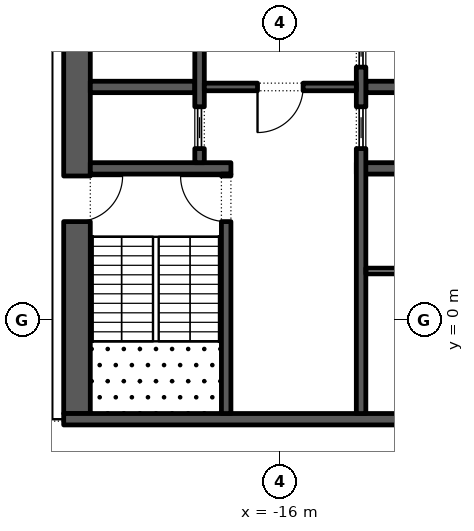
"""IFC4 building model, lengths in metres.
Left out: names, types, materials, properties, quantities, classifications, styles, units other than length and angle.
Written with IfcOpenShell. Run it as: python <this file> out.ifc"""

import sys

from ifc_helpers import new_model, si_unit, direction, frame, frame_2d, origin, place, context, subcontext, project, spatial, rectangle, extrude, element, fill, save


model = new_model("IFC4")
c1 = context("Model", 3, precision=1e-05, world=origin(), true_north=direction((0.0, 1.0)))
c2 = subcontext(c1, "Body", "Model", "MODEL_VIEW")
j1 = project(units=[si_unit("LENGTHUNIT", "METRE"), si_unit("PLANEANGLEUNIT", "RADIAN")], contexts=[c1])
p1 = place(None, origin())
s1 = spatial("IfcSite", under=j1, at=p1, CompositionType="ELEMENT")
p2 = place(p1, origin())
s2 = spatial("IfcBuilding", under=s1, at=p2, CompositionType="ELEMENT")
p3 = place(p2, frame((0.0, 0.0, 201.0)))
s3 = spatial("IfcBuildingStorey", under=s2, at=p3, CompositionType="ELEMENT", Elevation=201.0)
p4 = place(p3, frame((-33.157, 30.092, 0.0), z_axis=(0.0, 0.0, 1.0), x_axis=(0.224950279389, -0.974370243697, 0.0)))
e1 = element("IfcWall", 1, at=p4, inside=s3, PredefinedType="STANDARD", context=c2, shape_type="SweptSolid", body=[
    extrude(rectangle(XDim=49.5, YDim=0.3, at=frame_2d((24.75, 0.0))), origin(), (0.0, 0.0, 1.0), 4.0),
])
p5 = place(p4, frame((2.207, 0.0, 0.0)))
e2 = element("IfcOpeningElement", 2, at=p5, cuts=e1, PredefinedType="OPENING", context=c2, shape_type="SweptSolid", body=[
    extrude(rectangle(XDim=2.4, YDim=3.5, at=frame_2d((1.2, 1.75))), frame((0.0, 0.16, 0.0), z_axis=(0.0, -1.0, 0.0), x_axis=(1.0, 0.0, 0.0)), (0.0, 0.0, 1.0), 0.32),
])
p6 = place(p4, frame((8.121, 0.0, 0.45)))
e3 = element("IfcOpeningElement", 3, at=p6, cuts=e1, PredefinedType="OPENING", context=c2, shape_type="SweptSolid", body=[
    extrude(rectangle(XDim=4.5, YDim=2.825, at=frame_2d((2.25, 1.413))), frame((0.0, 0.16, 0.0), z_axis=(0.0, -1.0, 0.0), x_axis=(1.0, 0.0, 0.0)), (0.0, 0.0, 1.0), 0.32),
])
p7 = place(p4, frame((15.236, 0.0, 0.45)))
e4 = element("IfcOpeningElement", 4, at=p7, cuts=e1, PredefinedType="OPENING", context=c2, shape_type="SweptSolid", body=[
    extrude(rectangle(XDim=4.5, YDim=2.95, at=frame_2d((2.25, 1.475))), frame((0.0, 0.16, 0.0), z_axis=(0.0, -1.0, 0.0), x_axis=(1.0, 0.0, 0.0)), (0.0, 0.0, 1.0), 0.32),
])
p8 = place(p4, frame((22.35, 0.0, 0.45)))
e5 = element("IfcOpeningElement", 5, at=p8, cuts=e1, PredefinedType="OPENING", context=c2, shape_type="SweptSolid", body=[
    extrude(rectangle(XDim=4.5, YDim=3.0, at=frame_2d((2.25, 1.5))), frame((0.0, 0.16, 0.0), z_axis=(0.0, -1.0, 0.0), x_axis=(1.0, 0.0, 0.0)), (0.0, 0.0, 1.0), 0.32),
])
p9 = place(p4, frame((30.514, 0.0, 0.0)))
e6 = element("IfcOpeningElement", 6, at=p9, cuts=e1, PredefinedType="OPENING", context=c2, shape_type="SweptSolid", body=[
    extrude(rectangle(XDim=2.4, YDim=3.5, at=frame_2d((1.2, 1.75))), frame((0.0, 0.16, 0.0), z_axis=(0.0, -1.0, 0.0), x_axis=(1.0, 0.0, 0.0)), (0.0, 0.0, 1.0), 0.32),
])
p10 = place(p4, frame((36.579, 0.0, 0.45)))
e7 = element("IfcOpeningElement", 7, at=p10, cuts=e1, PredefinedType="OPENING", context=c2, shape_type="SweptSolid", body=[
    extrude(rectangle(XDim=4.5, YDim=3.05, at=frame_2d((2.25, 1.525))), frame((0.0, 0.16, 0.0), z_axis=(0.0, -1.0, 0.0), x_axis=(1.0, 0.0, 0.0)), (0.0, 0.0, 1.0), 0.32),
])
p11 = place(p4, frame((43.693, 0.0, 0.45)))
e8 = element("IfcOpeningElement", 8, at=p11, cuts=e1, PredefinedType="OPENING", context=c2, shape_type="SweptSolid", body=[
    extrude(rectangle(XDim=4.5, YDim=3.05, at=frame_2d((2.25, 1.525))), frame((0.0, 0.16, 0.0), z_axis=(0.0, -1.0, 0.0), x_axis=(1.0, 0.0, 0.0)), (0.0, 0.0, 1.0), 0.32),
])
p12 = place(p3, frame((-21.35, -2.45, 0.0), z_axis=(0.0, 0.0, 1.0), x_axis=(0.0, 1.0, 0.0)))
e9 = element("IfcWall", 9, at=p12, inside=s3, PredefinedType="SHEAR", context=c2, shape_type="SweptSolid", body=[
    extrude(rectangle(XDim=27.9, YDim=0.7, at=frame_2d((13.95, 0.0))), origin(), (0.0, 0.0, 1.0), 4.0),
])
p13 = place(p12, frame((5.05, 0.0, 0.0)))
e10 = element("IfcOpeningElement", 10, at=p13, cuts=e9, PredefinedType="OPENING", context=c2, shape_type="SweptSolid", body=[
    extrude(rectangle(XDim=1.2, YDim=2.1, at=frame_2d((0.6, 1.05))), frame((0.0, 0.36, 0.0), z_axis=(0.0, -1.0, 0.0), x_axis=(1.0, 0.0, 0.0)), (0.0, 0.0, 1.0), 0.72),
])
p14 = place(p12, frame((21.65, 0.0, 0.0)))
e11 = element("IfcOpeningElement", 11, at=p14, cuts=e9, PredefinedType="OPENING", context=c2, shape_type="SweptSolid", body=[
    extrude(rectangle(XDim=1.2, YDim=2.1, at=frame_2d((0.6, 1.05))), frame((0.0, 0.36, 0.0), z_axis=(0.0, -1.0, 0.0), x_axis=(1.0, 0.0, 0.0)), (0.0, 0.0, 1.0), 0.72),
])
p15 = place(p3, frame((-21.7, -2.6, 0.0), z_axis=(0.0, 0.0, 1.0), x_axis=(1.0, 0.0, 0.0)))
e12 = element("IfcWall", 12, at=p15, inside=s3, PredefinedType="SHEAR", context=c2, shape_type="SweptSolid", body=[
    extrude(rectangle(XDim=11.4, YDim=0.3, at=frame_2d((5.7, 0.0))), origin(), (0.0, 0.0, 1.0), 4.0),
])
p16 = place(p3, frame((-21.0, 4.0, 0.0), z_axis=(0.0, 0.0, 1.0), x_axis=(1.0, 0.0, 0.0)))
e13 = element("IfcWall", 13, at=p16, inside=s3, PredefinedType="SHEAR", context=c2, shape_type="SweptSolid", body=[
    extrude(rectangle(XDim=3.7, YDim=0.3, at=frame_2d((1.85, 0.0))), origin(), (0.0, 0.0, 1.0), 4.0),
])
p17 = place(p3, frame((-17.425, -2.45, 0.0), z_axis=(0.0, 0.0, 1.0), x_axis=(0.0, 1.0, 0.0)))
e14 = element("IfcWall", 14, at=p17, inside=s3, PredefinedType="SHEAR", context=c2, shape_type="SweptSolid", body=[
    extrude(rectangle(XDim=6.3, YDim=0.25, at=frame_2d((3.15, 0.0))), origin(), (0.0, 0.0, 1.0), 4.0),
])
p18 = place(p17, frame((5.05, 0.0, 0.0)))
e15 = element("IfcOpeningElement", 15, at=p18, cuts=e14, PredefinedType="OPENING", context=c2, shape_type="SweptSolid", body=[
    extrude(rectangle(XDim=1.2, YDim=2.1, at=frame_2d((0.6, 1.05))), frame((0.0, 0.135, 0.0), z_axis=(0.0, -1.0, 0.0), x_axis=(1.0, 0.0, 0.0)), (0.0, 0.0, 1.0), 0.27),
])
p19 = place(p3, frame((-21.0, 6.143, 0.0), z_axis=(0.0, 0.0, 1.0), x_axis=(1.0, 0.0, 0.0)))
e16 = element("IfcWall", 16, at=p19, inside=s3, PredefinedType="SHEAR", context=c2, shape_type="SweptSolid", body=[
    extrude(rectangle(XDim=2.75, YDim=0.3, at=frame_2d((1.375, 0.0))), origin(), (0.0, 0.0, 1.0), 4.0),
])
p20 = place(p3, frame((-18.125, 4.15, 0.0), z_axis=(0.0, 0.0, 1.0), x_axis=(0.0, 1.0, 0.0)))
e17 = element("IfcWall", 17, at=p20, inside=s3, PredefinedType="SHEAR", context=c2, shape_type="SweptSolid", body=[
    extrude(rectangle(XDim=14.7, YDim=0.25, at=frame_2d((7.35, 0.0))), origin(), (0.0, 0.0, 1.0), 4.0),
])
p21 = place(p20, frame((3.446, 0.0, 0.0)))
e18 = element("IfcOpeningElement", 18, at=p21, cuts=e17, PredefinedType="OPENING", context=c2, shape_type="SweptSolid", body=[
    extrude(rectangle(XDim=0.9, YDim=2.1, at=frame_2d((0.45, 1.05))), frame((0.0, 0.135, 0.0), z_axis=(0.0, -1.0, 0.0), x_axis=(1.0, 0.0, 0.0)), (0.0, 0.0, 1.0), 0.27),
])
p22 = place(p20, frame((6.9, 0.0, 0.0)))
e19 = element("IfcOpeningElement", 19, at=p22, cuts=e17, PredefinedType="OPENING", context=c2, shape_type="SweptSolid", body=[
    extrude(rectangle(XDim=0.9, YDim=2.1, at=frame_2d((0.45, 1.05))), frame((0.0, 0.135, 0.0), z_axis=(0.0, -1.0, 0.0), x_axis=(1.0, 0.0, 0.0)), (0.0, 0.0, 1.0), 0.27),
])
p23 = place(p20, frame((10.354, 0.0, 0.0)))
e20 = element("IfcOpeningElement", 20, at=p23, cuts=e17, PredefinedType="OPENING", context=c2, shape_type="SweptSolid", body=[
    extrude(rectangle(XDim=0.9, YDim=2.1, at=frame_2d((0.45, 1.05))), frame((0.0, 0.135, 0.0), z_axis=(0.0, -1.0, 0.0), x_axis=(1.0, 0.0, 0.0)), (0.0, 0.0, 1.0), 0.27),
])
p24 = place(p20, frame((0.371, 0.0, 0.0)))
e21 = element("IfcOpeningElement", 21, at=p24, cuts=e17, PredefinedType="OPENING", context=c2, shape_type="SweptSolid", body=[
    extrude(rectangle(XDim=1.1, YDim=2.1, at=frame_2d((0.55, 1.05))), frame((0.0, 0.135, 0.0), z_axis=(0.0, -1.0, 0.0), x_axis=(1.0, 0.0, 0.0)), (0.0, 0.0, 1.0), 0.27),
])
p25 = place(p20, frame((13.229, 0.0, 0.0)))
e22 = element("IfcOpeningElement", 22, at=p25, cuts=e17, PredefinedType="OPENING", context=c2, shape_type="SweptSolid", body=[
    extrude(rectangle(XDim=1.1, YDim=2.1, at=frame_2d((0.55, 1.05))), frame((0.0, 0.135, 0.0), z_axis=(0.0, -1.0, 0.0), x_axis=(1.0, 0.0, 0.0)), (0.0, 0.0, 1.0), 0.27),
])
p26 = place(p3, frame((-14.0, 4.0, 0.0), z_axis=(0.0, 0.0, 1.0), x_axis=(1.0, 0.0, 0.0)))
e23 = element("IfcWall", 23, at=p26, inside=s3, PredefinedType="SHEAR", context=c2, shape_type="SweptSolid", body=[
    extrude(rectangle(XDim=3.0, YDim=0.3, at=frame_2d((1.5, 0.0))), origin(), (0.0, 0.0, 1.0), 4.0),
])
p27 = place(p3, frame((-13.75, 6.143, 0.0), z_axis=(0.0, 0.0, 1.0), x_axis=(1.0, 0.0, 0.0)))
e24 = element("IfcWall", 24, at=p27, inside=s3, PredefinedType="SHEAR", context=c2, shape_type="SweptSolid", body=[
    extrude(rectangle(XDim=2.75, YDim=0.3, at=frame_2d((1.375, 0.0))), origin(), (0.0, 0.0, 1.0), 4.0),
])
p28 = place(p3, frame((-13.875, -2.45, 0.0), z_axis=(0.0, 0.0, 1.0), x_axis=(0.0, 1.0, 0.0)))
e25 = element("IfcWall", 25, at=p28, inside=s3, PredefinedType="SHEAR", context=c2, shape_type="SweptSolid", body=[
    extrude(rectangle(XDim=21.3, YDim=0.25, at=frame_2d((10.65, 0.0))), origin(), (0.0, 0.0, 1.0), 4.0),
])
p29 = place(p28, frame((17.786, 0.0, 0.0)))
e26 = element("IfcOpeningElement", 26, at=p29, cuts=e25, PredefinedType="OPENING", context=c2, shape_type="SweptSolid", body=[
    extrude(rectangle(XDim=0.9, YDim=2.1, at=frame_2d((0.45, 1.05))), frame((0.0, 0.135, 0.0), z_axis=(0.0, -1.0, 0.0), x_axis=(1.0, 0.0, 0.0)), (0.0, 0.0, 1.0), 0.27),
])
p30 = place(p28, frame((6.971, 0.0, 0.0)))
e27 = element("IfcOpeningElement", 27, at=p30, cuts=e25, PredefinedType="OPENING", context=c2, shape_type="SweptSolid", body=[
    extrude(rectangle(XDim=1.1, YDim=2.1, at=frame_2d((0.55, 1.05))), frame((0.0, 0.135, 0.0), z_axis=(0.0, -1.0, 0.0), x_axis=(1.0, 0.0, 0.0)), (0.0, 0.0, 1.0), 0.27),
])
p31 = place(p28, frame((9.114, 0.0, 0.0)))
e28 = element("IfcOpeningElement", 28, at=p31, cuts=e25, PredefinedType="OPENING", context=c2, shape_type="SweptSolid", body=[
    extrude(rectangle(XDim=1.1, YDim=2.1, at=frame_2d((0.55, 1.05))), frame((0.0, 0.135, 0.0), z_axis=(0.0, -1.0, 0.0), x_axis=(1.0, 0.0, 0.0)), (0.0, 0.0, 1.0), 0.27),
])
p32 = place(p28, frame((11.257, 0.0, 0.0)))
e29 = element("IfcOpeningElement", 29, at=p32, cuts=e25, PredefinedType="OPENING", context=c2, shape_type="SweptSolid", body=[
    extrude(rectangle(XDim=1.1, YDim=2.1, at=frame_2d((0.55, 1.05))), frame((0.0, 0.135, 0.0), z_axis=(0.0, -1.0, 0.0), x_axis=(1.0, 0.0, 0.0)), (0.0, 0.0, 1.0), 0.27),
])
p33 = place(p28, frame((13.4, 0.0, 0.0)))
e30 = element("IfcOpeningElement", 30, at=p33, cuts=e25, PredefinedType="OPENING", context=c2, shape_type="SweptSolid", body=[
    extrude(rectangle(XDim=1.1, YDim=2.1, at=frame_2d((0.55, 1.05))), frame((0.0, 0.135, 0.0), z_axis=(0.0, -1.0, 0.0), x_axis=(1.0, 0.0, 0.0)), (0.0, 0.0, 1.0), 0.27),
])
p34 = place(p3, frame((-18.0, 6.143, 0.0), z_axis=(0.0, 0.0, 1.0), x_axis=(1.0, 0.0, 0.0)))
e31 = element("IfcWall", 31, at=p34, inside=s3, PredefinedType="SHEAR", context=c2, shape_type="SweptSolid", body=[
    extrude(rectangle(XDim=4.0, YDim=0.2, at=frame_2d((2.0, 0.0))), origin(), (0.0, 0.0, 1.0), 4.0),
])
p35 = place(p34, frame((1.4, 0.0, 0.0)))
e32 = element("IfcOpeningElement", 32, at=p35, cuts=e31, PredefinedType="OPENING", context=c2, shape_type="SweptSolid", body=[
    extrude(rectangle(XDim=1.2, YDim=2.1, at=frame_2d((0.6, 1.05))), frame((0.0, 0.11, 0.0), z_axis=(0.0, -1.0, 0.0), x_axis=(1.0, 0.0, 0.0)), (0.0, 0.0, 1.0), 0.22),
])
p36 = place(p3, frame((-13.75, 1.3, 0.0), z_axis=(0.0, 0.0, 1.0), x_axis=(1.0, 0.0, 0.0)))
e33 = element("IfcWall", 33, at=p36, inside=s3, PredefinedType="PARTITIONING", context=c2, shape_type="SweptSolid", body=[
    extrude(rectangle(XDim=2.75, YDim=0.15, at=frame_2d((1.375, 0.0))), origin(), (0.0, 0.0, 1.0), 4.0),
])
p37 = place(p24, origin())
e34 = element("IfcDoor", 34, at=p37, inside=s3, OperationType="SLIDING_TO_LEFT", PredefinedType="DOOR", context=c2, shape_type="SweptSolid", body=[
    extrude(rectangle(XDim=1.1, YDim=2.1, at=frame_2d((0.55, 1.05))), frame((0.0, 0.025, 0.0), z_axis=(0.0, -1.0, 0.0), x_axis=(1.0, 0.0, 0.0)), (0.0, 0.0, 1.0), 0.05),
])
fill(e21, e34)
p38 = place(p30, origin())
e35 = element("IfcDoor", 35, at=p38, inside=s3, OperationType="SLIDING_TO_LEFT", PredefinedType="DOOR", context=c2, shape_type="SweptSolid", body=[
    extrude(rectangle(XDim=1.1, YDim=2.1, at=frame_2d((0.55, 1.05))), frame((0.0, 0.025, 0.0), z_axis=(0.0, -1.0, 0.0), x_axis=(1.0, 0.0, 0.0)), (0.0, 0.0, 1.0), 0.05),
])
fill(e27, e35)
p39 = place(p31, origin())
e36 = element("IfcDoor", 36, at=p39, inside=s3, OperationType="SLIDING_TO_LEFT", PredefinedType="DOOR", context=c2, shape_type="SweptSolid", body=[
    extrude(rectangle(XDim=1.1, YDim=2.1, at=frame_2d((0.55, 1.05))), frame((0.0, 0.025, 0.0), z_axis=(0.0, -1.0, 0.0), x_axis=(1.0, 0.0, 0.0)), (0.0, 0.0, 1.0), 0.05),
])
fill(e28, e36)
p40 = place(p35, frame((1.2, 0.0, 0.0), z_axis=(0.0, 0.0, 1.0), x_axis=(-1.0, 0.0, 0.0)))
e37 = element("IfcDoor", 37, at=p40, inside=s3, OperationType="SINGLE_SWING_LEFT", PredefinedType="DOOR", context=c2, shape_type="SweptSolid", body=[
    extrude(rectangle(XDim=1.2, YDim=2.1, at=frame_2d((0.6, 1.05))), frame((0.0, 0.025, 0.0), z_axis=(0.0, -1.0, 0.0), x_axis=(1.0, 0.0, 0.0)), (0.0, 0.0, 1.0), 0.05),
])
fill(e32, e37)
p41 = place(p18, origin())
e38 = element("IfcDoor", 38, at=p41, inside=s3, OperationType="SINGLE_SWING_LEFT", PredefinedType="DOOR", context=c2, shape_type="SweptSolid", body=[
    extrude(rectangle(XDim=1.2, YDim=2.1, at=frame_2d((0.6, 1.05))), frame((0.0, 0.025, 0.0), z_axis=(0.0, -1.0, 0.0), x_axis=(1.0, 0.0, 0.0)), (0.0, 0.0, 1.0), 0.05),
])
fill(e15, e38)
p42 = place(p13, frame((1.2, 0.0, 0.0), z_axis=(0.0, 0.0, 1.0), x_axis=(-1.0, 0.0, 0.0)))
e39 = element("IfcDoor", 39, at=p42, inside=s3, OperationType="SINGLE_SWING_RIGHT", PredefinedType="DOOR", context=c2, shape_type="SweptSolid", body=[
    extrude(rectangle(XDim=1.2, YDim=2.1, at=frame_2d((0.6, 1.05))), frame((0.0, 0.025, 0.0), z_axis=(0.0, -1.0, 0.0), x_axis=(1.0, 0.0, 0.0)), (0.0, 0.0, 1.0), 0.05),
])
fill(e10, e39)
save(model, sys.argv[1])
